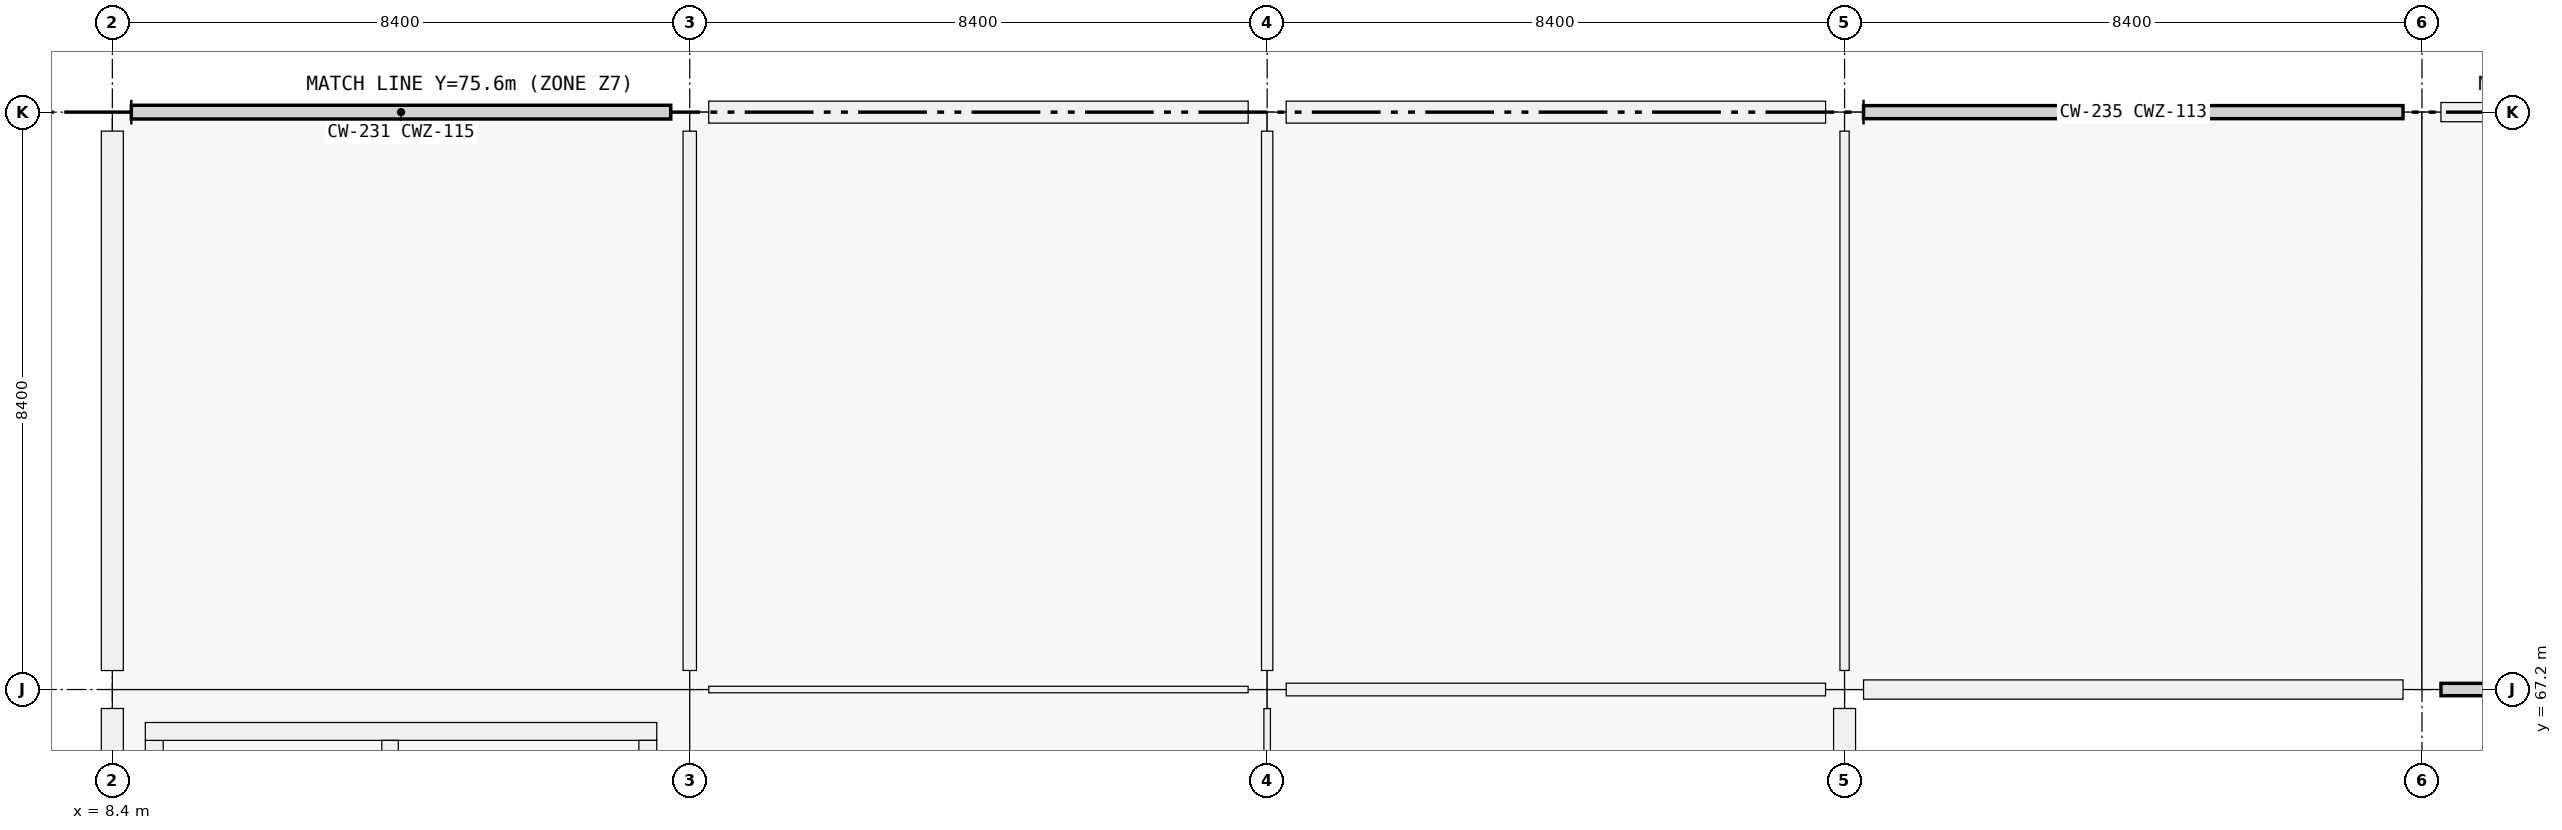
"""IFC4 building model, lengths in metres.
Left out: names, types, materials, properties, quantities, classifications, styles, units other than length and angle.
Written with IfcOpenShell. Run it as: python <this file> out.ifc"""

import sys

from ifc_helpers import new_model, si_unit, direction, frame, frame_2d, origin, origin_2d, place, context, subcontext, project, spatial, rectangle, i_section, extrude, element, fill, save


model = new_model("IFC4")
c1 = context("Model", 3, precision=1e-05, world=origin(), true_north=direction((0.0, 1.0)))
c2 = subcontext(c1, "Body", "Model", "MODEL_VIEW")
j1 = project(units=[si_unit("LENGTHUNIT", "METRE"), si_unit("PLANEANGLEUNIT", "RADIAN")], contexts=[c1])
p1 = place(None, origin())
s1 = spatial("IfcSite", under=j1, at=p1, CompositionType="ELEMENT")
p2 = place(p1, origin())
s2 = spatial("IfcBuilding", under=s1, at=p2, CompositionType="ELEMENT")
p3 = place(p2, frame((0.0, 0.0, 19.08)))
s3 = spatial("IfcBuildingStorey", under=s2, at=p3, CompositionType="ELEMENT", Elevation=19.08)
for number, where, z_axis, x_axis in (
    (1, (8.4, 67.2, 0.0), (0.0, 0.0, 1.0), (1.0, 0.0, 0.0)),
    (2, (8.4, 75.6, 0.0), (0.0, 0.0, 1.0), (1.0, 0.0, 0.0)),
    (3, (16.8, 67.2, 0.0), (0.0, 0.0, 1.0), (1.0, 0.0, 0.0)),
    (4, (16.8, 75.6, 0.0), (0.0, 0.0, 1.0), (1.0, 0.0, 0.0)),
    (5, (25.2, 67.2, 0.0), (0.0, 0.0, 1.0), (1.0, 0.0, 0.0)),
    (6, (25.2, 75.6, 0.0), (0.0, 0.0, 1.0), (1.0, 0.0, 0.0)),
    (7, (33.6, 67.2, 0.0), (0.0, 0.0, 1.0), (1.0, 0.0, 0.0)),
    (8, (33.6, 75.6, 0.0), (0.0, 0.0, 1.0), (1.0, 0.0, 0.0)),
):
    element("IfcColumn", number, at=place(p3, frame(where, z_axis=z_axis, x_axis=x_axis)), inside=s3, PredefinedType="COLUMN", context=c2, shape_type="SweptSolid", body=[
        extrude(rectangle(XDim=0.55, YDim=0.55, at=origin_2d()), origin(), (0.0, 0.0, 1.0), 4.16),
    ])
for number, where, z_axis, x_axis in (
    (9, (42.0, 67.2, 0.0), (0.0, 0.0, 1.0), (1.0, 0.0, 0.0)),
    (10, (42.0, 75.6, 0.0), (0.0, 0.0, 1.0), (1.0, 0.0, 0.0)),
):
    element("IfcColumn", number, at=place(p3, frame(where, z_axis=z_axis, x_axis=x_axis)), inside=s3, PredefinedType="COLUMN", context=c2, shape_type="SweptSolid", body=[
        extrude(rectangle(XDim=0.55, YDim=0.55, at=origin_2d()), origin(), (0.0, 0.0, 1.0), 4.07),
    ])
for number, where, z_axis, x_axis in (
    (11, (16.8, 67.2, 4.16), (0.0, 0.0, 1.0), (1.0, 0.0, 0.0)),
    (12, (25.2, 67.2, 4.16), (0.0, 0.0, 1.0), (1.0, 0.0, 0.0)),
    (13, (16.8, 75.6, 4.16), (0.0, 0.0, 1.0), (1.0, 0.0, 0.0)),
    (14, (25.2, 75.6, 4.16), (0.0, 0.0, 1.0), (1.0, 0.0, 0.0)),
):
    element("IfcColumn", number, at=place(p3, frame(where, z_axis=z_axis, x_axis=x_axis)), inside=s3, PredefinedType="COLUMN", context=c2, shape_type="SweptSolid", body=[
        extrude(i_section(OverallWidth=0.305, OverallDepth=0.308, WebThickness=0.01, FlangeThickness=0.015, FilletRadius=0.017, at=origin_2d()), origin(), (0.0, 0.0, 1.0), 1.925),
    ])
p4 = place(p3, frame((8.4, 59.076, 0.0), z_axis=(0.0, 0.0, 1.0), x_axis=(0.0, 1.0, 0.0)))
e15 = element("IfcWall", 15, at=p4, inside=s3, PredefinedType="SOLIDWALL", context=c2, shape_type="SweptSolid", body=[
    extrude(rectangle(XDim=7.848, YDim=0.32, at=frame_2d((3.924, 0.0))), origin(), (0.0, 0.0, 1.0), 3.37),
])
p5 = place(p3, frame((8.4, 67.476, 0.0), z_axis=(0.0, 0.0, 1.0), x_axis=(0.0, 1.0, 0.0)))
e16 = element("IfcWall", 16, at=p5, inside=s3, PredefinedType="SOLIDWALL", context=c2, shape_type="SweptSolid", body=[
    extrude(rectangle(XDim=7.848, YDim=0.32, at=frame_2d((3.924, 0.0))), origin(), (0.0, 0.0, 1.0), 3.37),
])
p6 = place(p3, frame((17.076, 75.6, 0.0), z_axis=(0.0, 0.0, 1.0), x_axis=(1.0, 0.0, 0.0)))
e17 = element("IfcWall", 17, at=p6, inside=s3, PredefinedType="SOLIDWALL", context=c2, shape_type="SweptSolid", body=[
    extrude(rectangle(XDim=7.848, YDim=0.32, at=frame_2d((3.924, 0.0))), origin(), (0.0, 0.0, 1.0), 3.37),
])
p7 = place(p3, frame((33.6, 66.924, 0.0), z_axis=(0.0, 0.0, 1.0), x_axis=(0.0, -1.0, 0.0)))
e18 = element("IfcWall", 18, at=p7, inside=s3, PredefinedType="SOLIDWALL", context=c2, shape_type="SweptSolid", body=[
    extrude(rectangle(XDim=7.848, YDim=0.32, at=frame_2d((3.924, 0.0))), origin(), (0.0, 0.0, 1.0), 3.37),
])
p8 = place(p7, frame((3.474, 0.0, 0.9)))
e19 = element("IfcOpeningElement", 19, at=p8, cuts=e18, PredefinedType="OPENING", context=c2, shape_type="SweptSolid", body=[
    extrude(rectangle(XDim=0.9, YDim=1.5, at=frame_2d((0.45, 0.75))), frame((0.0, 0.16, 0.0), z_axis=(0.0, -1.0, 0.0), x_axis=(1.0, 0.0, 0.0)), (0.0, 0.0, 1.0), 0.32),
])
p9 = place(p3, frame((25.476, 75.6, 0.0), z_axis=(0.0, 0.0, 1.0), x_axis=(1.0, 0.0, 0.0)))
e20 = element("IfcWall", 20, at=p9, inside=s3, PredefinedType="SOLIDWALL", context=c2, shape_type="SweptSolid", body=[
    extrude(rectangle(XDim=7.848, YDim=0.32, at=frame_2d((3.924, 0.0))), origin(), (0.0, 0.0, 1.0), 3.37),
])
p10 = place(p9, frame((3.074, 0.0, 0.9)))
e21 = element("IfcOpeningElement", 21, at=p10, cuts=e20, PredefinedType="OPENING", context=c2, shape_type="SweptSolid", body=[
    extrude(rectangle(XDim=1.7, YDim=1.85, at=frame_2d((0.85, 0.925))), frame((0.0, 0.16, 0.0), z_axis=(0.0, -1.0, 0.0), x_axis=(1.0, 0.0, 0.0)), (0.0, 0.0, 1.0), 0.32),
])
p11 = place(p3, frame((41.724, 67.2, 0.0), z_axis=(0.0, 0.0, 1.0), x_axis=(-1.0, 0.0, 0.0)))
e22 = element("IfcWall", 22, at=p11, inside=s3, PredefinedType="SOLIDWALL", context=c2, shape_type="SweptSolid", body=[
    extrude(rectangle(XDim=7.848, YDim=0.28, at=frame_2d((3.924, 0.0))), origin(), (0.0, 0.0, 1.0), 3.37),
])
p12 = place(p11, frame((2.774, 0.0, 0.9)))
e23 = element("IfcOpeningElement", 23, at=p12, cuts=e22, PredefinedType="OPENING", context=c2, shape_type="SweptSolid", body=[
    extrude(rectangle(XDim=2.3, YDim=1.85, at=frame_2d((1.15, 0.925))), frame((0.0, 0.14, 0.0), z_axis=(0.0, -1.0, 0.0), x_axis=(1.0, 0.0, 0.0)), (0.0, 0.0, 1.0), 0.28),
])
p13 = place(p3, frame((42.276, 75.6, 0.0), z_axis=(0.0, 0.0, 1.0), x_axis=(1.0, 0.0, 0.0)))
e24 = element("IfcWall", 24, at=p13, inside=s3, PredefinedType="SOLIDWALL", context=c2, shape_type="SweptSolid", body=[
    extrude(rectangle(XDim=7.848, YDim=0.28, at=frame_2d((3.924, 0.0))), origin(), (0.0, 0.0, 1.0), 3.37),
])
p14 = place(p13, frame((2.474, 0.0, 0.9)))
e25 = element("IfcOpeningElement", 25, at=p14, cuts=e24, PredefinedType="OPENING", context=c2, shape_type="SweptSolid", body=[
    extrude(rectangle(XDim=2.9, YDim=1.85, at=frame_2d((1.45, 0.925))), frame((0.0, 0.14, 0.0), z_axis=(0.0, -1.0, 0.0), x_axis=(1.0, 0.0, 0.0)), (0.0, 0.0, 1.0), 0.28),
])
p15 = place(p3, frame((9.01, 59.54, 0.0), z_axis=(0.0, 0.0, 1.0), x_axis=(0.0, 1.0, 0.0)))
e26 = element("IfcWall", 26, at=p15, inside=s3, PredefinedType="SHEAR", context=c2, shape_type="SweptSolid", body=[
    extrude(rectangle(XDim=6.92, YDim=0.26, at=frame_2d((3.46, 0.0))), origin(), (0.0, 0.0, 1.0), 4.07),
])
p16 = place(p3, frame((8.88, 66.59, 0.0), z_axis=(0.0, 0.0, 1.0), x_axis=(1.0, 0.0, 0.0)))
e27 = element("IfcWall", 27, at=p16, inside=s3, PredefinedType="SHEAR", context=c2, shape_type="SweptSolid", body=[
    extrude(rectangle(XDim=7.44, YDim=0.26, at=frame_2d((3.72, 0.0))), origin(), (0.0, 0.0, 1.0), 4.07),
])
p17 = place(p3, frame((16.19, 66.46, 0.0), z_axis=(0.0, 0.0, 1.0), x_axis=(0.0, -1.0, 0.0)))
e28 = element("IfcWall", 28, at=p17, inside=s3, PredefinedType="SHEAR", context=c2, shape_type="SweptSolid", body=[
    extrude(rectangle(XDim=6.92, YDim=0.26, at=frame_2d((3.46, 0.0))), origin(), (0.0, 0.0, 1.0), 4.07),
])
p18 = place(p3, frame((12.44, 59.54, 0.0), z_axis=(0.0, 0.0, 1.0), x_axis=(0.0, 1.0, 0.0)))
e29 = element("IfcWall", 29, at=p18, inside=s3, PredefinedType="SHEAR", context=c2, shape_type="SweptSolid", body=[
    extrude(rectangle(XDim=6.92, YDim=0.24, at=frame_2d((3.46, 0.0))), origin(), (0.0, 0.0, 1.0), 4.07),
])
p19 = place(p18, frame((0.12, 0.0, 0.0)))
e30 = element("IfcOpeningElement", 30, at=p19, cuts=e29, PredefinedType="OPENING", context=c2, shape_type="SweptSolid", body=[
    extrude(rectangle(XDim=1.0, YDim=2.15, at=frame_2d((0.5, 1.075))), frame((0.0, 0.12, 0.0), z_axis=(0.0, -1.0, 0.0), x_axis=(1.0, 0.0, 0.0)), (0.0, 0.0, 1.0), 0.24),
])
p20 = place(p3, frame((17.077, 67.2, 0.0), z_axis=(0.0, 0.0, 1.0), x_axis=(1.0, 0.0, 0.0)))
e31 = element("IfcWall", 31, at=p20, inside=s3, PredefinedType="PARTITIONING", context=c2, shape_type="SweptSolid", body=[
    extrude(rectangle(XDim=7.846, YDim=0.095, at=frame_2d((3.923, 0.0))), origin(), (0.0, 0.0, 1.0), 3.19),
])
p21 = place(p20, frame((3.458, 0.0, 0.0)))
e32 = element("IfcOpeningElement", 32, at=p21, cuts=e31, PredefinedType="OPENING", context=c2, shape_type="SweptSolid", body=[
    extrude(rectangle(XDim=0.93, YDim=2.12, at=frame_2d((0.465, 1.06))), frame((0.0, 0.047, 0.0), z_axis=(0.0, -1.0, 0.0), x_axis=(1.0, 0.0, 0.0)), (0.0, 0.0, 1.0), 0.095),
])
p22 = place(p3, frame((25.477, 67.2, 0.0), z_axis=(0.0, 0.0, 1.0), x_axis=(1.0, 0.0, 0.0)))
e33 = element("IfcWall", 33, at=p22, inside=s3, PredefinedType="PARTITIONING", context=c2, shape_type="SweptSolid", body=[
    extrude(rectangle(XDim=7.846, YDim=0.185, at=frame_2d((3.923, 0.0))), origin(), (0.0, 0.0, 1.0), 3.19),
])
p23 = place(p22, frame((3.453, 0.0, 0.0)))
e34 = element("IfcOpeningElement", 34, at=p23, cuts=e33, PredefinedType="OPENING", context=c2, shape_type="SweptSolid", body=[
    extrude(rectangle(XDim=0.94, YDim=2.15, at=frame_2d((0.47, 1.075))), frame((0.0, 0.093, 0.0), z_axis=(0.0, -1.0, 0.0), x_axis=(1.0, 0.0, 0.0)), (0.0, 0.0, 1.0), 0.185),
])
p24 = place(p3, frame((16.8, 67.477, 0.0), z_axis=(0.0, 0.0, 1.0), x_axis=(0.0, 1.0, 0.0)))
e35 = element("IfcWall", 35, at=p24, inside=s3, PredefinedType="PARTITIONING", context=c2, shape_type="SweptSolid", body=[
    extrude(rectangle(XDim=7.846, YDim=0.195, at=frame_2d((3.923, 0.0))), origin(), (0.0, 0.0, 1.0), 3.19),
])
p25 = place(p24, frame((3.403, 0.0, 0.0)))
e36 = element("IfcOpeningElement", 36, at=p25, cuts=e35, PredefinedType="OPENING", context=c2, shape_type="SweptSolid", body=[
    extrude(rectangle(XDim=1.04, YDim=2.2, at=frame_2d((0.52, 1.1))), frame((0.0, 0.098, 0.0), z_axis=(0.0, -1.0, 0.0), x_axis=(1.0, 0.0, 0.0)), (0.0, 0.0, 1.0), 0.195),
])
p26 = place(p3, frame((25.2, 59.077, 0.0), z_axis=(0.0, 0.0, 1.0), x_axis=(0.0, 1.0, 0.0)))
e37 = element("IfcWall", 37, at=p26, inside=s3, PredefinedType="PARTITIONING", context=c2, shape_type="SweptSolid", body=[
    extrude(rectangle(XDim=7.846, YDim=0.095, at=frame_2d((3.923, 0.0))), origin(), (0.0, 0.0, 1.0), 3.19),
])
p27 = place(p26, frame((3.433, 0.0, 0.0)))
e38 = element("IfcOpeningElement", 38, at=p27, cuts=e37, PredefinedType="OPENING", context=c2, shape_type="SweptSolid", body=[
    extrude(rectangle(XDim=0.98, YDim=2.18, at=frame_2d((0.49, 1.09))), frame((0.0, 0.047, 0.0), z_axis=(0.0, -1.0, 0.0), x_axis=(1.0, 0.0, 0.0)), (0.0, 0.0, 1.0), 0.095),
])
p28 = place(p3, frame((25.2, 67.477, 0.0), z_axis=(0.0, 0.0, 1.0), x_axis=(0.0, 1.0, 0.0)))
e39 = element("IfcWall", 39, at=p28, inside=s3, PredefinedType="PARTITIONING", context=c2, shape_type="SweptSolid", body=[
    extrude(rectangle(XDim=7.846, YDim=0.165, at=frame_2d((3.923, 0.0))), origin(), (0.0, 0.0, 1.0), 3.19),
])
p29 = place(p28, frame((3.438, 0.0, 0.0)))
e40 = element("IfcOpeningElement", 40, at=p29, cuts=e39, PredefinedType="OPENING", context=c2, shape_type="SweptSolid", body=[
    extrude(rectangle(XDim=0.97, YDim=2.12, at=frame_2d((0.485, 1.06))), frame((0.0, 0.083, 0.0), z_axis=(0.0, -1.0, 0.0), x_axis=(1.0, 0.0, 0.0)), (0.0, 0.0, 1.0), 0.165),
])
p30 = place(p3, frame((33.6, 67.477, 0.0), z_axis=(0.0, 0.0, 1.0), x_axis=(0.0, 1.0, 0.0)))
e41 = element("IfcWall", 41, at=p30, inside=s3, PredefinedType="PARTITIONING", context=c2, shape_type="SweptSolid", body=[
    extrude(rectangle(XDim=7.846, YDim=0.135, at=frame_2d((3.923, 0.0))), origin(), (0.0, 0.0, 1.0), 3.19),
])
p31 = place(p30, frame((3.443, 0.0, 0.0)))
e42 = element("IfcOpeningElement", 42, at=p31, cuts=e41, PredefinedType="OPENING", context=c2, shape_type="SweptSolid", body=[
    extrude(rectangle(XDim=0.96, YDim=2.18, at=frame_2d((0.48, 1.09))), frame((0.0, 0.067, 0.0), z_axis=(0.0, -1.0, 0.0), x_axis=(1.0, 0.0, 0.0)), (0.0, 0.0, 1.0), 0.135),
])
p32 = place(p10, origin())
e43 = element("IfcWindow", 43, at=p32, inside=s3, PartitioningType="SINGLE_PANEL", PredefinedType="WINDOW", context=c2, shape_type="SweptSolid", body=[
    extrude(rectangle(XDim=1.7, YDim=1.85, at=frame_2d((0.85, 0.925))), frame((0.0, 0.03, 0.0), z_axis=(0.0, -1.0, 0.0), x_axis=(1.0, 0.0, 0.0)), (0.0, 0.0, 1.0), 0.06),
])
fill(e21, e43)
p33 = place(p12, origin())
e44 = element("IfcWindow", 44, at=p33, inside=s3, PartitioningType="SINGLE_PANEL", PredefinedType="WINDOW", context=c2, shape_type="SweptSolid", body=[
    extrude(rectangle(XDim=2.3, YDim=1.85, at=frame_2d((1.15, 0.925))), frame((0.0, 0.03, 0.0), z_axis=(0.0, -1.0, 0.0), x_axis=(1.0, 0.0, 0.0)), (0.0, 0.0, 1.0), 0.06),
])
fill(e23, e44)
p34 = place(p21, origin())
e45 = element("IfcDoor", 45, at=p34, inside=s3, OperationType="SINGLE_SWING_LEFT", PredefinedType="DOOR", context=c2, shape_type="SweptSolid", body=[
    extrude(rectangle(XDim=0.93, YDim=2.12, at=frame_2d((0.465, 1.06))), frame((0.0, 0.025, 0.0), z_axis=(0.0, -1.0, 0.0), x_axis=(1.0, 0.0, 0.0)), (0.0, 0.0, 1.0), 0.05),
])
fill(e32, e45)
p35 = place(p31, origin())
e46 = element("IfcDoor", 46, at=p35, inside=s3, OperationType="SINGLE_SWING_RIGHT", PredefinedType="DOOR", context=c2, shape_type="SweptSolid", body=[
    extrude(rectangle(XDim=0.96, YDim=2.18, at=frame_2d((0.48, 1.09))), frame((0.0, 0.025, 0.0), z_axis=(0.0, -1.0, 0.0), x_axis=(1.0, 0.0, 0.0)), (0.0, 0.0, 1.0), 0.05),
])
fill(e42, e46)
p36 = place(p25, origin())
e47 = element("IfcDoor", 47, at=p36, inside=s3, OperationType="SINGLE_SWING_LEFT", PredefinedType="DOOR", context=c2, shape_type="SweptSolid", body=[
    extrude(rectangle(XDim=1.04, YDim=2.2, at=frame_2d((0.52, 1.1))), frame((0.0, 0.025, 0.0), z_axis=(0.0, -1.0, 0.0), x_axis=(1.0, 0.0, 0.0)), (0.0, 0.0, 1.0), 0.05),
])
fill(e36, e47)
p37 = place(p23, origin())
e48 = element("IfcDoor", 48, at=p37, inside=s3, OperationType="SINGLE_SWING_RIGHT", PredefinedType="DOOR", context=c2, shape_type="SweptSolid", body=[
    extrude(rectangle(XDim=0.94, YDim=2.15, at=frame_2d((0.47, 1.075))), frame((0.0, 0.025, 0.0), z_axis=(0.0, -1.0, 0.0), x_axis=(1.0, 0.0, 0.0)), (0.0, 0.0, 1.0), 0.05),
])
fill(e34, e48)
p38 = place(p29, origin())
e49 = element("IfcDoor", 49, at=p38, inside=s3, OperationType="SINGLE_SWING_RIGHT", PredefinedType="DOOR", context=c2, shape_type="SweptSolid", body=[
    extrude(rectangle(XDim=0.97, YDim=2.12, at=frame_2d((0.485, 1.06))), frame((0.0, 0.025, 0.0), z_axis=(0.0, -1.0, 0.0), x_axis=(1.0, 0.0, 0.0)), (0.0, 0.0, 1.0), 0.05),
])
fill(e40, e49)
save(model, sys.argv[1])
